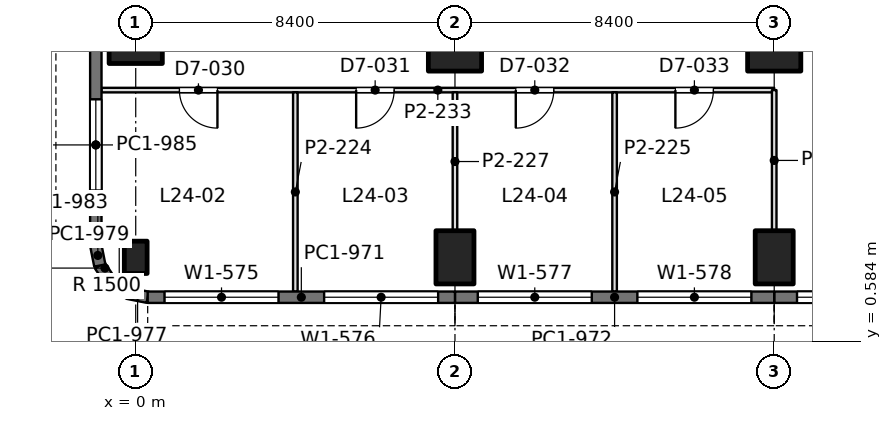
"""IFC4 building model, lengths in metres.
Left out: names, types, materials, properties, quantities, classifications, styles, units other than length and angle.
Written with IfcOpenShell. Run it as: python <this file> out.ifc"""

import sys

from ifc_helpers import new_model, si_unit, direction, frame, frame_2d, origin, origin_2d, place, context, subcontext, project, spatial, rectangle, extrude, element, fill, save


model = new_model("IFC4")
c1 = context("Model", 3, precision=1e-05, world=origin(), true_north=direction((0.0, 1.0)))
c2 = subcontext(c1, "Body", "Model", "MODEL_VIEW")
j1 = project(units=[si_unit("LENGTHUNIT", "METRE"), si_unit("PLANEANGLEUNIT", "RADIAN")], contexts=[c1])
p1 = place(None, origin())
s1 = spatial("IfcSite", under=j1, at=p1, CompositionType="ELEMENT")
p2 = place(p1, origin())
s2 = spatial("IfcBuilding", under=s1, at=p2, CompositionType="ELEMENT")
p3 = place(p2, frame((0.0, 0.0, 109.2)))
s3 = spatial("IfcBuildingStorey", under=s2, at=p3, CompositionType="ELEMENT", Elevation=109.2)
p4 = place(p3, frame((0.0, 2.8, 0.0), z_axis=(0.0, 0.0, 1.0), x_axis=(1.0, 0.0, 0.0)))
e1 = element("IfcColumn", 1, at=p4, inside=s3, PredefinedType="COLUMN", context=c2, shape_type="SweptSolid", body=[
    extrude(rectangle(XDim=0.6, YDim=0.85, at=origin_2d()), origin(), (0.0, 0.0, 1.0), 4.2),
])
for number, where, z_axis, x_axis in (
    (2, (0.0, 8.4, 0.0), (0.0, 0.0, 1.0), (0.0, 1.0, 0.0)),
    (3, (8.4, 2.8, 0.0), (0.0, 0.0, 1.0), (1.0, 0.0, 0.0)),
):
    element("IfcColumn", number, at=place(p3, frame(where, z_axis=z_axis, x_axis=x_axis)), inside=s3, PredefinedType="COLUMN", context=c2, shape_type="SweptSolid", body=[
        extrude(rectangle(XDim=1.0, YDim=1.4, at=origin_2d()), origin(), (0.0, 0.0, 1.0), 4.2),
    ])
p5 = place(p3, frame((8.4, 8.4, 0.0), z_axis=(0.0, 0.0, 1.0), x_axis=(1.0, 0.0, 0.0)))
e4 = element("IfcColumn", 4, at=p5, inside=s3, PredefinedType="COLUMN", context=c2, shape_type="SweptSolid", body=[
    extrude(rectangle(XDim=1.4, YDim=1.4, at=origin_2d()), origin(), (0.0, 0.0, 1.0), 4.2),
])
p6 = place(p3, frame((16.8, 2.8, 0.0), z_axis=(0.0, 0.0, 1.0), x_axis=(1.0, 0.0, 0.0)))
e5 = element("IfcColumn", 5, at=p6, inside=s3, PredefinedType="COLUMN", context=c2, shape_type="SweptSolid", body=[
    extrude(rectangle(XDim=1.0, YDim=1.4, at=origin_2d()), origin(), (0.0, 0.0, 1.0), 4.2),
])
p7 = place(p3, frame((16.8, 8.4, 0.0), z_axis=(0.0, 0.0, 1.0), x_axis=(1.0, 0.0, 0.0)))
e6 = element("IfcColumn", 6, at=p7, inside=s3, PredefinedType="COLUMN", context=c2, shape_type="SweptSolid", body=[
    extrude(rectangle(XDim=1.4, YDim=1.4, at=origin_2d()), origin(), (0.0, 0.0, 1.0), 4.2),
])
p8 = place(p3, frame((25.2, 1.75, 0.0), z_axis=(0.0, 0.0, 1.0), x_axis=(-1.0, 0.0, 0.0)))
e7 = element("IfcWall", 7, at=p8, inside=s3, PredefinedType="SOLIDWALL", context=c2, shape_type="SweptSolid", body=[
    extrude(rectangle(XDim=8.4, YDim=0.3, at=frame_2d((4.2, 0.0))), origin(), (0.0, 0.0, 1.0), 4.05),
])
p9 = place(p8, frame((0.6, 0.0, 0.9)))
e8 = element("IfcOpeningElement", 8, at=p9, cuts=e7, PredefinedType="OPENING", context=c2, shape_type="SweptSolid", body=[
    extrude(rectangle(XDim=3.0, YDim=1.9, at=frame_2d((1.5, 0.95))), frame((0.0, 0.16, 0.0), z_axis=(0.0, -1.0, 0.0), x_axis=(1.0, 0.0, 0.0)), (0.0, 0.0, 1.0), 0.32),
])
p10 = place(p8, frame((4.8, 0.0, 0.9)))
e9 = element("IfcOpeningElement", 9, at=p10, cuts=e7, PredefinedType="OPENING", context=c2, shape_type="SweptSolid", body=[
    extrude(rectangle(XDim=3.0, YDim=1.9, at=frame_2d((1.5, 0.95))), frame((0.0, 0.16, 0.0), z_axis=(0.0, -1.0, 0.0), x_axis=(1.0, 0.0, 0.0)), (0.0, 0.0, 1.0), 0.32),
])
p11 = place(p3, frame((16.8, 1.75, 0.0), z_axis=(0.0, 0.0, 1.0), x_axis=(-1.0, 0.0, 0.0)))
e10 = element("IfcWall", 10, at=p11, inside=s3, PredefinedType="SOLIDWALL", context=c2, shape_type="SweptSolid", body=[
    extrude(rectangle(XDim=8.4, YDim=0.3, at=frame_2d((4.2, 0.0))), origin(), (0.0, 0.0, 1.0), 4.05),
])
p12 = place(p11, frame((0.6, 0.0, 0.9)))
e11 = element("IfcOpeningElement", 11, at=p12, cuts=e10, PredefinedType="OPENING", context=c2, shape_type="SweptSolid", body=[
    extrude(rectangle(XDim=3.0, YDim=1.9, at=frame_2d((1.5, 0.95))), frame((0.0, 0.16, 0.0), z_axis=(0.0, -1.0, 0.0), x_axis=(1.0, 0.0, 0.0)), (0.0, 0.0, 1.0), 0.32),
])
p13 = place(p11, frame((4.8, 0.0, 0.9)))
e12 = element("IfcOpeningElement", 12, at=p13, cuts=e10, PredefinedType="OPENING", context=c2, shape_type="SweptSolid", body=[
    extrude(rectangle(XDim=3.0, YDim=1.9, at=frame_2d((1.5, 0.95))), frame((0.0, 0.16, 0.0), z_axis=(0.0, -1.0, 0.0), x_axis=(1.0, 0.0, 0.0)), (0.0, 0.0, 1.0), 0.32),
])
p14 = place(p3, frame((8.4, 1.75, 0.0), z_axis=(0.0, 0.0, 1.0), x_axis=(-1.0, 0.0, 0.0)))
e13 = element("IfcWall", 13, at=p14, inside=s3, PredefinedType="SOLIDWALL", context=c2, shape_type="SweptSolid", body=[
    extrude(rectangle(XDim=8.085, YDim=0.3, at=frame_2d((4.042, 0.0))), origin(), (0.0, 0.0, 1.0), 4.05),
])
p15 = place(p14, frame((0.443, 0.0, 0.9)))
e14 = element("IfcOpeningElement", 14, at=p15, cuts=e13, PredefinedType="OPENING", context=c2, shape_type="SweptSolid", body=[
    extrude(rectangle(XDim=3.0, YDim=1.9, at=frame_2d((1.5, 0.95))), frame((0.0, 0.16, 0.0), z_axis=(0.0, -1.0, 0.0), x_axis=(1.0, 0.0, 0.0)), (0.0, 0.0, 1.0), 0.32),
])
p16 = place(p14, frame((4.643, 0.0, 0.9)))
e15 = element("IfcOpeningElement", 15, at=p16, cuts=e13, PredefinedType="OPENING", context=c2, shape_type="SweptSolid", body=[
    extrude(rectangle(XDim=3.0, YDim=1.9, at=frame_2d((1.5, 0.95))), frame((0.0, 0.16, 0.0), z_axis=(0.0, -1.0, 0.0), x_axis=(1.0, 0.0, 0.0)), (0.0, 0.0, 1.0), 0.32),
])
p17 = place(p3, frame((0.315, 1.75, 0.0), z_axis=(0.0, 0.0, 1.0), x_axis=(-0.980788534345, 0.195073962632, 0.0)))
e16 = element("IfcWall", 16, at=p17, inside=s3, PredefinedType="SOLIDWALL", context=c2, shape_type="SweptSolid", body=[
    extrude(rectangle(XDim=0.541, YDim=0.3, at=frame_2d((0.271, 0.0))), origin(), (0.0, 0.0, 1.0), 4.05),
])
for number, where, z_axis, x_axis in (
    (17, (-0.216, 1.855, 0.0), (0.0, 0.0, 1.0), (-0.831, 0.556, 0.0)),
    (18, (-0.653, 2.147, 0.0), (0.0, 0.0, 1.0), (-0.556, 0.831, 0.0)),
):
    element("IfcWall", number, at=place(p3, frame(where, z_axis=z_axis, x_axis=x_axis)), inside=s3, PredefinedType="SOLIDWALL", context=c2, shape_type="SweptSolid", body=[
        extrude(rectangle(XDim=0.526, YDim=0.3, at=frame_2d((0.263, 0.0))), origin(), (0.0, 0.0, 1.0), 4.05),
    ])
p18 = place(p3, frame((-0.945, 2.584, 0.0), z_axis=(0.0, 0.0, 1.0), x_axis=(-0.195073962632, 0.980788534345, 0.0)))
e19 = element("IfcWall", 19, at=p18, inside=s3, PredefinedType="SOLIDWALL", context=c2, shape_type="SweptSolid", body=[
    extrude(rectangle(XDim=0.541, YDim=0.3, at=frame_2d((0.271, 0.0))), origin(), (0.0, 0.0, 1.0), 4.05),
])
p19 = place(p3, frame((-1.05, 3.115, 0.0), z_axis=(0.0, 0.0, 1.0), x_axis=(0.0, 1.0, 0.0)))
e20 = element("IfcWall", 20, at=p19, inside=s3, PredefinedType="SOLIDWALL", context=c2, shape_type="SweptSolid", body=[
    extrude(rectangle(XDim=5.285, YDim=0.3, at=frame_2d((2.643, 0.0))), origin(), (0.0, 0.0, 1.0), 4.05),
])
p20 = place(p19, frame((1.443, 0.0, 0.9)))
e21 = element("IfcOpeningElement", 21, at=p20, cuts=e20, PredefinedType="OPENING", context=c2, shape_type="SweptSolid", body=[
    extrude(rectangle(XDim=2.4, YDim=1.9, at=frame_2d((1.2, 0.95))), frame((0.0, 0.16, 0.0), z_axis=(0.0, -1.0, 0.0), x_axis=(1.0, 0.0, 0.0)), (0.0, 0.0, 1.0), 0.32),
])
p21 = place(p3, frame((-0.902, 7.2, 0.0), z_axis=(0.0, 0.0, 1.0), x_axis=(1.0, 0.0, 0.0)))
e22 = element("IfcWall", 22, at=p21, inside=s3, PredefinedType="PARTITIONING", context=c2, shape_type="SweptSolid", body=[
    extrude(rectangle(XDim=17.702, YDim=0.12, at=frame_2d((8.851, 0.0))), origin(), (0.0, 0.0, 1.0), 3.55),
])
p22 = place(p21, frame((2.052, 0.0, 0.0)))
e23 = element("IfcOpeningElement", 23, at=p22, cuts=e22, PredefinedType="OPENING", context=c2, shape_type="SweptSolid", body=[
    extrude(rectangle(XDim=1.0, YDim=2.4, at=frame_2d((0.5, 1.2))), frame((0.0, 0.07, 0.0), z_axis=(0.0, -1.0, 0.0), x_axis=(1.0, 0.0, 0.0)), (0.0, 0.0, 1.0), 0.14),
])
p23 = place(p21, frame((6.702, 0.0, 0.0)))
e24 = element("IfcOpeningElement", 24, at=p23, cuts=e22, PredefinedType="OPENING", context=c2, shape_type="SweptSolid", body=[
    extrude(rectangle(XDim=1.0, YDim=2.4, at=frame_2d((0.5, 1.2))), frame((0.0, 0.07, 0.0), z_axis=(0.0, -1.0, 0.0), x_axis=(1.0, 0.0, 0.0)), (0.0, 0.0, 1.0), 0.14),
])
p24 = place(p21, frame((10.902, 0.0, 0.0)))
e25 = element("IfcOpeningElement", 25, at=p24, cuts=e22, PredefinedType="OPENING", context=c2, shape_type="SweptSolid", body=[
    extrude(rectangle(XDim=1.0, YDim=2.4, at=frame_2d((0.5, 1.2))), frame((0.0, 0.07, 0.0), z_axis=(0.0, -1.0, 0.0), x_axis=(1.0, 0.0, 0.0)), (0.0, 0.0, 1.0), 0.14),
])
p25 = place(p21, frame((15.102, 0.0, 0.0)))
e26 = element("IfcOpeningElement", 26, at=p25, cuts=e22, PredefinedType="OPENING", context=c2, shape_type="SweptSolid", body=[
    extrude(rectangle(XDim=1.0, YDim=2.4, at=frame_2d((0.5, 1.2))), frame((0.0, 0.07, 0.0), z_axis=(0.0, -1.0, 0.0), x_axis=(1.0, 0.0, 0.0)), (0.0, 0.0, 1.0), 0.14),
])
p26 = place(p3, frame((4.2, 1.898, 0.0), z_axis=(0.0, 0.0, 1.0), x_axis=(0.0, 1.0, 0.0)))
e27 = element("IfcWall", 27, at=p26, inside=s3, PredefinedType="PARTITIONING", context=c2, shape_type="SweptSolid", body=[
    extrude(rectangle(XDim=5.244, YDim=0.12, at=frame_2d((2.622, 0.0))), origin(), (0.0, 0.0, 1.0), 3.56),
])
p27 = place(p3, frame((8.4, 3.499, 0.0), z_axis=(0.0, 0.0, 1.0), x_axis=(0.0, 1.0, 0.0)))
e28 = element("IfcWall", 28, at=p27, inside=s3, PredefinedType="PARTITIONING", context=c2, shape_type="SweptSolid", body=[
    extrude(rectangle(XDim=3.643, YDim=0.12, at=frame_2d((1.822, 0.0))), origin(), (0.0, 0.0, 1.0), 3.55),
])
p28 = place(p3, frame((12.6, 1.898, 0.0), z_axis=(0.0, 0.0, 1.0), x_axis=(0.0, 1.0, 0.0)))
e29 = element("IfcWall", 29, at=p28, inside=s3, PredefinedType="PARTITIONING", context=c2, shape_type="SweptSolid", body=[
    extrude(rectangle(XDim=5.244, YDim=0.12, at=frame_2d((2.622, 0.0))), origin(), (0.0, 0.0, 1.0), 3.56),
])
p29 = place(p3, frame((16.8, 3.499, 0.0), z_axis=(0.0, 0.0, 1.0), x_axis=(0.0, 1.0, 0.0)))
e30 = element("IfcWall", 30, at=p29, inside=s3, PredefinedType="PARTITIONING", context=c2, shape_type="SweptSolid", body=[
    extrude(rectangle(XDim=3.701, YDim=0.12, at=frame_2d((1.851, 0.0))), origin(), (0.0, 0.0, 1.0), 3.55),
])
p30 = place(p10, origin())
e31 = element("IfcWindow", 31, at=p30, inside=s3, PartitioningType="SINGLE_PANEL", PredefinedType="WINDOW", context=c2, shape_type="SweptSolid", body=[
    extrude(rectangle(XDim=3.0, YDim=1.9, at=frame_2d((1.5, 0.95))), frame((0.0, 0.03, 0.0), z_axis=(0.0, -1.0, 0.0), x_axis=(1.0, 0.0, 0.0)), (0.0, 0.0, 1.0), 0.06),
])
fill(e9, e31)
p31 = place(p12, origin())
e32 = element("IfcWindow", 32, at=p31, inside=s3, PartitioningType="SINGLE_PANEL", PredefinedType="WINDOW", context=c2, shape_type="SweptSolid", body=[
    extrude(rectangle(XDim=3.0, YDim=1.9, at=frame_2d((1.5, 0.95))), frame((0.0, 0.03, 0.0), z_axis=(0.0, -1.0, 0.0), x_axis=(1.0, 0.0, 0.0)), (0.0, 0.0, 1.0), 0.06),
])
fill(e11, e32)
p32 = place(p13, origin())
e33 = element("IfcWindow", 33, at=p32, inside=s3, PartitioningType="SINGLE_PANEL", PredefinedType="WINDOW", context=c2, shape_type="SweptSolid", body=[
    extrude(rectangle(XDim=3.0, YDim=1.9, at=frame_2d((1.5, 0.95))), frame((0.0, 0.03, 0.0), z_axis=(0.0, -1.0, 0.0), x_axis=(1.0, 0.0, 0.0)), (0.0, 0.0, 1.0), 0.06),
])
fill(e12, e33)
p33 = place(p15, origin())
e34 = element("IfcWindow", 34, at=p33, inside=s3, PartitioningType="SINGLE_PANEL", PredefinedType="WINDOW", context=c2, shape_type="SweptSolid", body=[
    extrude(rectangle(XDim=3.0, YDim=1.9, at=frame_2d((1.5, 0.95))), frame((0.0, 0.03, 0.0), z_axis=(0.0, -1.0, 0.0), x_axis=(1.0, 0.0, 0.0)), (0.0, 0.0, 1.0), 0.06),
])
fill(e14, e34)
p34 = place(p16, origin())
e35 = element("IfcWindow", 35, at=p34, inside=s3, PartitioningType="SINGLE_PANEL", PredefinedType="WINDOW", context=c2, shape_type="SweptSolid", body=[
    extrude(rectangle(XDim=3.0, YDim=1.9, at=frame_2d((1.5, 0.95))), frame((0.0, 0.03, 0.0), z_axis=(0.0, -1.0, 0.0), x_axis=(1.0, 0.0, 0.0)), (0.0, 0.0, 1.0), 0.06),
])
fill(e15, e35)
p35 = place(p20, origin())
e36 = element("IfcWindow", 36, at=p35, inside=s3, PartitioningType="SINGLE_PANEL", PredefinedType="WINDOW", context=c2, shape_type="SweptSolid", body=[
    extrude(rectangle(XDim=2.4, YDim=1.9, at=frame_2d((1.2, 0.95))), frame((0.0, 0.03, 0.0), z_axis=(0.0, -1.0, 0.0), x_axis=(1.0, 0.0, 0.0)), (0.0, 0.0, 1.0), 0.06),
])
fill(e21, e36)
p36 = place(p22, frame((1.0, 0.0, 0.0), z_axis=(0.0, 0.0, 1.0), x_axis=(-1.0, 0.0, 0.0)))
e37 = element("IfcDoor", 37, at=p36, inside=s3, OperationType="SINGLE_SWING_LEFT", PredefinedType="DOOR", context=c2, shape_type="SweptSolid", body=[
    extrude(rectangle(XDim=1.0, YDim=2.4, at=frame_2d((0.5, 1.2))), frame((0.0, 0.025, 0.0), z_axis=(0.0, -1.0, 0.0), x_axis=(1.0, 0.0, 0.0)), (0.0, 0.0, 1.0), 0.05),
])
fill(e23, e37)
p37 = place(p23, frame((1.0, 0.0, 0.0), z_axis=(0.0, 0.0, 1.0), x_axis=(-1.0, 0.0, 0.0)))
e38 = element("IfcDoor", 38, at=p37, inside=s3, OperationType="SINGLE_SWING_RIGHT", PredefinedType="DOOR", context=c2, shape_type="SweptSolid", body=[
    extrude(rectangle(XDim=1.0, YDim=2.4, at=frame_2d((0.5, 1.2))), frame((0.0, 0.025, 0.0), z_axis=(0.0, -1.0, 0.0), x_axis=(1.0, 0.0, 0.0)), (0.0, 0.0, 1.0), 0.05),
])
fill(e24, e38)
p38 = place(p24, frame((1.0, 0.0, 0.0), z_axis=(0.0, 0.0, 1.0), x_axis=(-1.0, 0.0, 0.0)))
e39 = element("IfcDoor", 39, at=p38, inside=s3, OperationType="SINGLE_SWING_RIGHT", PredefinedType="DOOR", context=c2, shape_type="SweptSolid", body=[
    extrude(rectangle(XDim=1.0, YDim=2.4, at=frame_2d((0.5, 1.2))), frame((0.0, 0.025, 0.0), z_axis=(0.0, -1.0, 0.0), x_axis=(1.0, 0.0, 0.0)), (0.0, 0.0, 1.0), 0.05),
])
fill(e25, e39)
p39 = place(p25, frame((1.0, 0.0, 0.0), z_axis=(0.0, 0.0, 1.0), x_axis=(-1.0, 0.0, 0.0)))
e40 = element("IfcDoor", 40, at=p39, inside=s3, OperationType="SINGLE_SWING_RIGHT", PredefinedType="DOOR", context=c2, shape_type="SweptSolid", body=[
    extrude(rectangle(XDim=1.0, YDim=2.4, at=frame_2d((0.5, 1.2))), frame((0.0, 0.025, 0.0), z_axis=(0.0, -1.0, 0.0), x_axis=(1.0, 0.0, 0.0)), (0.0, 0.0, 1.0), 0.05),
])
fill(e26, e40)
save(model, sys.argv[1])
